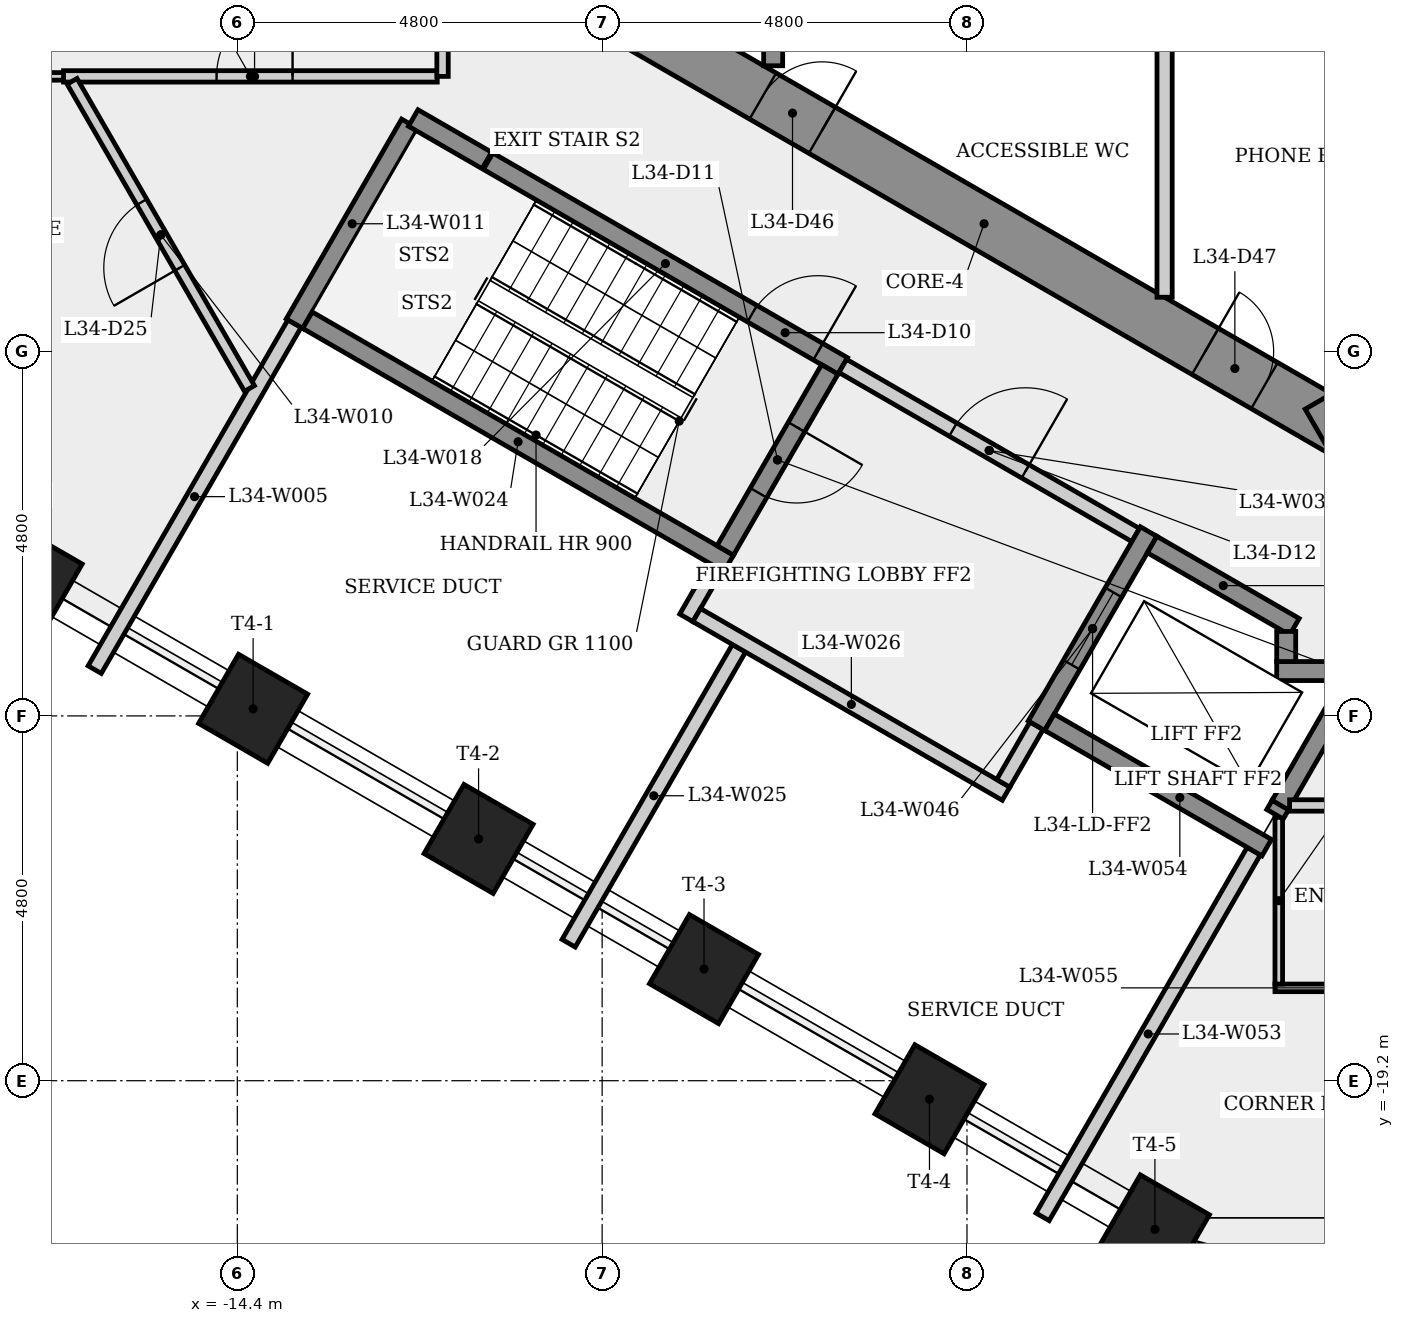
"""IFC4 building model, lengths in metres.
Left out: names, types, materials, properties, quantities, classifications, styles, units other than length and angle.
Written with IfcOpenShell. Run it as: python <this file> out.ifc"""

import sys

from ifc_helpers import new_model, si_unit, direction, frame, frame_2d, origin, origin_2d, place, context, subcontext, project, spatial, rectangle, extrude, element, fill, save


model = new_model("IFC4")
c1 = context("Model", 3, precision=1e-05, world=origin(), true_north=direction((0.0, 1.0)))
c2 = subcontext(c1, "Body", "Model", "MODEL_VIEW")
j1 = project(units=[si_unit("LENGTHUNIT", "METRE"), si_unit("PLANEANGLEUNIT", "RADIAN")], contexts=[c1])
p1 = place(None, origin())
s1 = spatial("IfcSite", under=j1, at=p1, CompositionType="ELEMENT")
p2 = place(p1, origin())
s2 = spatial("IfcBuilding", under=s1, at=p2, CompositionType="ELEMENT")
p3 = place(p2, frame((0.0, 0.0, 128.5)))
s3 = spatial("IfcBuildingStorey", under=s2, at=p3, CompositionType="ELEMENT", Elevation=128.5)
p4 = place(p3, frame((-9.325, -5.182, 0.0), z_axis=(0.0, 0.0, 1.0), x_axis=(0.866023993627, -0.500002442456, 0.0)))
e1 = element("IfcWall", 1, at=p4, inside=s3, PredefinedType="SHEAR", context=c2, shape_type="SweptSolid", body=[
    extrude(rectangle(XDim=10.97, YDim=0.7, at=frame_2d((5.485, 0.0))), origin(), (0.0, 0.0, 1.0), 4.0),
])
p5 = place(p4, frame((2.125, 0.0, 0.0)))
e2 = element("IfcOpeningElement", 2, at=p5, cuts=e1, PredefinedType="OPENING", context=c2, shape_type="SweptSolid", body=[
    extrude(rectangle(XDim=0.9, YDim=2.1, at=frame_2d((0.45, 1.05))), frame((0.0, 0.36, 0.0), z_axis=(0.0, -1.0, 0.0), x_axis=(1.0, 0.0, 0.0)), (0.0, 0.0, 1.0), 0.72),
])
p6 = place(p4, frame((8.845, 0.0, 0.0)))
e3 = element("IfcOpeningElement", 3, at=p6, cuts=e1, PredefinedType="OPENING", context=c2, shape_type="SweptSolid", body=[
    extrude(rectangle(XDim=0.9, YDim=2.1, at=frame_2d((0.45, 1.05))), frame((0.0, 0.36, 0.0), z_axis=(0.0, -1.0, 0.0), x_axis=(1.0, 0.0, 0.0)), (0.0, 0.0, 1.0), 0.72),
])
p7 = place(p3, frame((-0.175, -10.667, 0.0), z_axis=(0.0, 0.0, 1.0), x_axis=(0.866023993627, 0.500002442456, 0.0)))
e4 = element("IfcWall", 4, at=p7, inside=s3, PredefinedType="SHEAR", context=c2, shape_type="SweptSolid", body=[
    extrude(rectangle(XDim=10.97, YDim=0.7, at=frame_2d((5.485, 0.0))), origin(), (0.0, 0.0, 1.0), 4.0),
])
p8 = place(p7, frame((7.599, 0.0, 0.0)))
e5 = element("IfcOpeningElement", 5, at=p8, cuts=e4, PredefinedType="OPENING", context=c2, shape_type="SweptSolid", body=[
    extrude(rectangle(XDim=0.9, YDim=2.1, at=frame_2d((0.45, 1.05))), frame((0.0, 0.36, 0.0), z_axis=(0.0, -1.0, 0.0), x_axis=(1.0, 0.0, 0.0)), (0.0, 0.0, 1.0), 0.72),
])
for number, where, z_axis, x_axis in (
    (6, (-17.158, -12.594, 0.0), (0.0, 0.0, 1.0), (-0.5, -0.866, 0.0)),
    (7, (-14.192, -14.306, 0.0), (0.0, 0.0, 1.0), (-0.5, -0.866, 0.0)),
    (8, (-11.226, -16.019, 0.0), (0.0, 0.0, 1.0), (-0.5, -0.866, 0.0)),
    (9, (-8.26, -17.731, 0.0), (0.0, 0.0, 1.0), (-0.5, -0.866, 0.0)),
    (10, (-5.293, -19.444, 0.0), (0.0, 0.0, 1.0), (-0.5, -0.866, 0.0)),
    (11, (-2.327, -21.156, 0.0), (0.0, 0.0, 1.0), (-0.5, -0.866, 0.0)),
):
    element("IfcColumn", number, at=place(p3, frame(where, z_axis=z_axis, x_axis=x_axis)), inside=s3, PredefinedType="COLUMN", context=c2, shape_type="SweptSolid", body=[
        extrude(rectangle(XDim=1.05, YDim=1.05, at=origin_2d()), origin(), (0.0, 0.0, 1.0), 4.0),
    ])
p9 = place(p3, frame((-16.686, -5.985, 0.0), z_axis=(0.0, 0.0, 1.0), x_axis=(1.0, 0.0, 0.0)))
e12 = element("IfcWall", 12, at=p9, inside=s3, PredefinedType="PARTITIONING", context=c2, shape_type="SweptSolid", body=[
    extrude(rectangle(XDim=4.917, YDim=0.15, at=frame_2d((2.458, 0.0))), origin(), (0.0, 0.0, 1.0), 3.65),
])
p10 = place(p9, frame((2.013, 0.0, 0.0)))
e13 = element("IfcOpeningElement", 13, at=p10, cuts=e12, PredefinedType="OPENING", context=c2, shape_type="SweptSolid", body=[
    extrude(rectangle(XDim=1.0, YDim=2.1, at=frame_2d((0.5, 1.05))), frame((0.0, 0.085, 0.0), z_axis=(0.0, -1.0, 0.0), x_axis=(1.0, 0.0, 0.0)), (0.0, 0.0, 1.0), 0.17),
])
p11 = place(p3, frame((-16.686, -5.985, 0.0), z_axis=(0.0, 0.0, 1.0), x_axis=(-1.0, 0.0, 0.0)))
e14 = element("IfcWall", 14, at=p11, inside=s3, PredefinedType="PARTITIONING", context=c2, shape_type="SweptSolid", body=[
    extrude(rectangle(XDim=2.007, YDim=0.1, at=frame_2d((1.003, 0.0))), origin(), (0.0, 0.0, 1.0), 3.65),
])
p12 = place(p3, frame((-16.276, -13.791, 0.0), z_axis=(0.0, 0.0, 1.0), x_axis=(0.499970375258, 0.866042506961, 0.0)))
e15 = element("IfcWall", 15, at=p12, inside=s3, PredefinedType="PLUMBINGWALL", context=c2, shape_type="SweptSolid", body=[
    extrude(rectangle(XDim=5.257, YDim=0.2, at=frame_2d((2.628, 0.0))), origin(), (0.0, 0.0, 1.0), 3.65),
])
p13 = place(p3, frame((-14.24, -10.092, 0.0), z_axis=(0.0, 0.0, 1.0), x_axis=(-0.500021330162, 0.86601308846, 0.0)))
e16 = element("IfcWall", 16, at=p13, inside=s3, PredefinedType="PARTITIONING", context=c2, shape_type="SweptSolid", body=[
    extrude(rectangle(XDim=4.667, YDim=0.15, at=frame_2d((2.333, 0.0))), origin(), (0.0, 0.0, 1.0), 3.65),
])
p14 = place(p13, frame((1.833, 0.0, 0.0)))
e17 = element("IfcOpeningElement", 17, at=p14, cuts=e16, PredefinedType="OPENING", context=c2, shape_type="SweptSolid", body=[
    extrude(rectangle(XDim=1.0, YDim=2.1, at=frame_2d((0.5, 1.05))), frame((0.0, 0.085, 0.0), z_axis=(0.0, -1.0, 0.0), x_axis=(1.0, 0.0, 0.0)), (0.0, 0.0, 1.0), 0.17),
])
p15 = place(p3, frame((-13.648, -9.239, 0.0), z_axis=(0.0, 0.0, 1.0), x_axis=(0.50000556753, 0.866022189346, 0.0)))
e18 = element("IfcWall", 18, at=p15, inside=s3, PredefinedType="SHEAR", context=c2, shape_type="SweptSolid", body=[
    extrude(rectangle(XDim=3.036, YDim=0.25, at=frame_2d((1.518, 0.0))), origin(), (0.0, 0.0, 1.0), 3.65),
])
p16 = place(p3, frame((-12.085, -6.532, 0.0), z_axis=(0.0, 0.0, 1.0), x_axis=(0.86604373436, -0.499968249168, 0.0)))
e19 = element("IfcWall", 19, at=p16, inside=s3, PredefinedType="SHEAR", context=c2, shape_type="SweptSolid", body=[
    extrude(rectangle(XDim=1.118, YDim=0.25, at=frame_2d((0.559, 0.0))), origin(), (0.0, 0.0, 1.0), 3.65),
])
p17 = place(p3, frame((-11.7, 6.06, 0.0), z_axis=(0.0, 0.0, 1.0), x_axis=(0.0, -1.0, 0.0)))
e20 = element("IfcWall", 20, at=p17, inside=s3, PredefinedType="PARTITIONING", context=c2, shape_type="SweptSolid", body=[
    extrude(rectangle(XDim=12.046, YDim=0.15, at=frame_2d((6.023, 0.0))), origin(), (0.0, 0.0, 1.0), 3.65),
])
p18 = place(p17, frame((6.755, 0.0, 0.0)))
e21 = element("IfcOpeningElement", 21, at=p18, cuts=e20, PredefinedType="OPENING", context=c2, shape_type="SweptSolid", body=[
    extrude(rectangle(XDim=0.9, YDim=2.1, at=frame_2d((0.45, 1.05))), frame((0.0, 0.085, 0.0), z_axis=(0.0, -1.0, 0.0), x_axis=(1.0, 0.0, 0.0)), (0.0, 0.0, 1.0), 0.17),
])
p19 = place(p3, frame((-11.1, -7.101, 0.0), z_axis=(0.0, 0.0, 1.0), x_axis=(0.866028615007, -0.499994437958, 0.0)))
e22 = element("IfcWall", 22, at=p19, inside=s3, PredefinedType="SHEAR", context=c2, shape_type="SweptSolid", body=[
    extrude(rectangle(XDim=5.387, YDim=0.25, at=frame_2d((2.694, 0.0))), origin(), (0.0, 0.0, 1.0), 3.65),
])
p20 = place(p19, frame((4.012, 0.0, 0.0)))
e23 = element("IfcOpeningElement", 23, at=p20, cuts=e22, PredefinedType="OPENING", context=c2, shape_type="SweptSolid", body=[
    extrude(rectangle(XDim=1.0, YDim=2.1, at=frame_2d((0.5, 1.05))), frame((0.0, 0.135, 0.0), z_axis=(0.0, -1.0, 0.0), x_axis=(1.0, 0.0, 0.0)), (0.0, 0.0, 1.0), 0.27),
])
p21 = place(p3, frame((-8.493, -13.11, 0.0), z_axis=(0.0, 0.0, 1.0), x_axis=(0.500067724834, 0.865986299303, 0.0)))
e24 = element("IfcWall", 24, at=p21, inside=s3, PredefinedType="PLUMBINGWALL", context=c2, shape_type="SweptSolid", body=[
    extrude(rectangle(XDim=0.775, YDim=0.2, at=frame_2d((0.388, 0.0))), origin(), (0.0, 0.0, 1.0), 3.65),
])
p22 = place(p3, frame((-7.935, -12.393, 0.0), z_axis=(0.0, 0.0, 1.0), x_axis=(-0.866025499775, 0.499999833739, 0.0)))
e25 = element("IfcWall", 25, at=p22, inside=s3, PredefinedType="SHEAR", context=c2, shape_type="SweptSolid", body=[
    extrude(rectangle(XDim=6.4, YDim=0.25, at=frame_2d((3.2, 0.0))), origin(), (0.0, 0.0, 1.0), 3.65),
])
p23 = place(p3, frame((-7.8, -13.51, 0.0), z_axis=(0.0, 0.0, 1.0), x_axis=(-0.499994393058, -0.866028640929, 0.0)))
e26 = element("IfcWall", 26, at=p23, inside=s3, PredefinedType="PLUMBINGWALL", context=c2, shape_type="SweptSolid", body=[
    extrude(rectangle(XDim=4.481, YDim=0.2, at=frame_2d((2.241, 0.0))), origin(), (0.0, 0.0, 1.0), 3.65),
])
p24 = place(p3, frame((-8.356, -13.073, 0.0), z_axis=(0.0, 0.0, 1.0), x_axis=(0.866038532462, -0.499977259774, 0.0)))
e27 = element("IfcWall", 27, at=p24, inside=s3, PredefinedType="PLUMBINGWALL", context=c2, shape_type="SweptSolid", body=[
    extrude(rectangle(XDim=4.7, YDim=0.2, at=frame_2d((2.35, 0.0))), origin(), (0.0, 0.0, 1.0), 3.65),
])
p25 = place(p3, frame((-7.35, -5.846, 0.0), z_axis=(0.0, 0.0, 1.0), x_axis=(0.0, 1.0, 0.0)))
e28 = element("IfcWall", 28, at=p25, inside=s3, PredefinedType="SHEAR", context=c2, shape_type="SweptSolid", body=[
    extrude(rectangle(XDim=4.171, YDim=0.25, at=frame_2d((2.085, 0.0))), origin(), (0.0, 0.0, 1.0), 3.65),
])
p26 = place(p3, frame((-6.605, -9.841, 0.0), z_axis=(0.0, 0.0, 1.0), x_axis=(-0.499996545922, -0.866027397988, 0.0)))
e29 = element("IfcWall", 29, at=p26, inside=s3, PredefinedType="SHEAR", context=c2, shape_type="SweptSolid", body=[
    extrude(rectangle(XDim=2.75, YDim=0.25, at=frame_2d((1.375, 0.0))), origin(), (0.0, 0.0, 1.0), 3.65),
])
p27 = place(p26, frame((0.875, 0.0, 0.0)))
e30 = element("IfcOpeningElement", 30, at=p27, cuts=e29, PredefinedType="OPENING", context=c2, shape_type="SweptSolid", body=[
    extrude(rectangle(XDim=1.0, YDim=2.1, at=frame_2d((0.5, 1.05))), frame((0.0, 0.135, 0.0), z_axis=(0.0, -1.0, 0.0), x_axis=(1.0, 0.0, 0.0)), (0.0, 0.0, 1.0), 0.27),
])
p28 = place(p3, frame((-6.435, -9.795, 0.0), z_axis=(0.0, 0.0, 1.0), x_axis=(0.866012907634, -0.500021643343, 0.0)))
e31 = element("IfcWall", 31, at=p28, inside=s3, PredefinedType="PARTITIONING", context=c2, shape_type="SweptSolid", body=[
    extrude(rectangle(XDim=4.45, YDim=0.2, at=frame_2d((2.225, 0.0))), origin(), (0.0, 0.0, 1.0), 3.65),
])
p29 = place(p28, frame((1.675, 0.0, 0.0)))
e32 = element("IfcOpeningElement", 32, at=p29, cuts=e31, PredefinedType="OPENING", context=c2, shape_type="SweptSolid", body=[
    extrude(rectangle(XDim=1.1, YDim=2.1, at=frame_2d((0.55, 1.05))), frame((0.0, 0.11, 0.0), z_axis=(0.0, -1.0, 0.0), x_axis=(1.0, 0.0, 0.0)), (0.0, 0.0, 1.0), 0.22),
])
p30 = place(p3, frame((-3.885, -14.529, 0.0), z_axis=(0.0, 0.0, 1.0), x_axis=(-0.499859285417, -0.866106630146, 0.0)))
e33 = element("IfcWall", 33, at=p30, inside=s3, PredefinedType="PLUMBINGWALL", context=c2, shape_type="SweptSolid", body=[
    extrude(rectangle(XDim=0.875, YDim=0.2, at=frame_2d((0.438, 0.0))), origin(), (0.0, 0.0, 1.0), 3.65),
])
p31 = place(p3, frame((-2.41, -11.974, 0.0), z_axis=(0.0, 0.0, 1.0), x_axis=(-0.500001826776, -0.866024349092, 0.0)))
e34 = element("IfcWall", 34, at=p31, inside=s3, PredefinedType="SHEAR", context=c2, shape_type="SweptSolid", body=[
    extrude(rectangle(XDim=2.95, YDim=0.25, at=frame_2d((1.475, 0.0))), origin(), (0.0, 0.0, 1.0), 3.65),
])
p32 = place(p31, frame((0.925, 0.0, 0.0)))
e35 = element("IfcOpeningElement", 35, at=p32, cuts=e34, PredefinedType="OPENING", context=c2, shape_type="SweptSolid", body=[
    extrude(rectangle(XDim=1.1, YDim=2.1, at=frame_2d((0.55, 1.05))), frame((0.0, 0.135, 0.0), z_axis=(0.0, -1.0, 0.0), x_axis=(1.0, 0.0, 0.0)), (0.0, 0.0, 1.0), 0.27),
])
p33 = place(p3, frame((-2.364, -12.145, 0.0), z_axis=(0.0, 0.0, 1.0), x_axis=(0.86603892542, -0.499976579108, 0.0)))
e36 = element("IfcWall", 36, at=p33, inside=s3, PredefinedType="SHEAR", context=c2, shape_type="SweptSolid", body=[
    extrude(rectangle(XDim=2.162, YDim=0.25, at=frame_2d((1.081, 0.0))), origin(), (0.0, 0.0, 1.0), 3.65),
])
p34 = place(p3, frame((-2.2, -5.275, 0.0), z_axis=(0.0, 0.0, 1.0), x_axis=(0.0, -1.0, 0.0)))
e37 = element("IfcWall", 37, at=p34, inside=s3, PredefinedType="PARTITIONING", context=c2, shape_type="SweptSolid", body=[
    extrude(rectangle(XDim=3.616, YDim=0.2, at=frame_2d((1.808, 0.0))), origin(), (0.0, 0.0, 1.0), 3.65),
])
p35 = place(p3, frame((-1.027, -16.179, 0.0), z_axis=(0.0, 0.0, 1.0), x_axis=(-0.499995019066, -0.866028279509, 0.0)))
e38 = element("IfcWall", 38, at=p35, inside=s3, PredefinedType="PLUMBINGWALL", context=c2, shape_type="SweptSolid", body=[
    extrude(rectangle(XDim=5.557, YDim=0.2, at=frame_2d((2.778, 0.0))), origin(), (0.0, 0.0, 1.0), 3.65),
])
p36 = place(p3, frame((-0.856, -16.133, 0.0), z_axis=(0.0, 0.0, 1.0), x_axis=(-0.866021716278, 0.500006386895, 0.0)))
e39 = element("IfcWall", 39, at=p36, inside=s3, PredefinedType="SHEAR", context=c2, shape_type="SweptSolid", body=[
    extrude(rectangle(XDim=3.3, YDim=0.25, at=frame_2d((1.65, 0.0))), origin(), (0.0, 0.0, 1.0), 3.65),
])
p37 = place(p3, frame((-0.748, -17.979, 0.0), z_axis=(0.0, 0.0, 1.0), x_axis=(1.0, 0.0, 0.0)))
e40 = element("IfcWall", 40, at=p37, inside=s3, PredefinedType="PARTITIONING", context=c2, shape_type="SweptSolid", body=[
    extrude(rectangle(XDim=2.567, YDim=0.1, at=frame_2d((1.283, 0.0))), origin(), (0.0, 0.0, 1.0), 3.65),
])
p38 = place(p37, frame((0.883, 0.0, 0.0)))
e41 = element("IfcOpeningElement", 41, at=p38, cuts=e40, PredefinedType="OPENING", context=c2, shape_type="SweptSolid", body=[
    extrude(rectangle(XDim=0.8, YDim=2.1, at=frame_2d((0.4, 1.05))), frame((0.0, 0.06, 0.0), z_axis=(0.0, -1.0, 0.0), x_axis=(1.0, 0.0, 0.0)), (0.0, 0.0, 1.0), 0.12),
])
p39 = place(p3, frame((-0.698, -15.733, 0.0), z_axis=(0.0, 0.0, 1.0), x_axis=(0.0, -1.0, 0.0)))
e42 = element("IfcWall", 42, at=p39, inside=s3, PredefinedType="PARTITIONING", context=c2, shape_type="SweptSolid", body=[
    extrude(rectangle(XDim=2.195, YDim=0.1, at=frame_2d((1.098, 0.0))), origin(), (0.0, 0.0, 1.0), 3.65),
])
p40 = place(p3, frame((-0.673, -15.565, 0.0), z_axis=(0.0, 0.0, 1.0), x_axis=(-0.499486146622, -0.866321873978, 0.0)))
e43 = element("IfcWall", 43, at=p40, inside=s3, PredefinedType="SHEAR", context=c2, shape_type="SweptSolid", body=[
    extrude(rectangle(XDim=0.149, YDim=0.25, at=frame_2d((0.075, 0.0))), origin(), (0.0, 0.0, 1.0), 4.0),
])
p41 = place(p3, frame((-0.725, -13.81, 0.0), z_axis=(0.0, 0.0, 1.0), x_axis=(1.0, 0.0, 0.0)))
e44 = element("IfcWall", 44, at=p41, inside=s3, PredefinedType="SHEAR", context=c2, shape_type="SweptSolid", body=[
    extrude(rectangle(XDim=1.191, YDim=0.25, at=frame_2d((0.595, 0.0))), origin(), (0.0, 0.0, 1.0), 3.65),
])
p42 = place(p3, frame((-0.6, -13.289, 0.0), z_axis=(0.0, 0.0, 1.0), x_axis=(0.0, -1.0, 0.0)))
e45 = element("IfcWall", 45, at=p42, inside=s3, PredefinedType="SHEAR", context=c2, shape_type="SweptSolid", body=[
    extrude(rectangle(XDim=0.396, YDim=0.25, at=frame_2d((0.198, 0.0))), origin(), (0.0, 0.0, 1.0), 4.0),
])
p43 = place(p3, frame((0.278, -13.918, 0.0), z_axis=(0.0, 0.0, 1.0), x_axis=(-0.499984020225, -0.866034629516, 0.0)))
e46 = element("IfcWall", 46, at=p43, inside=s3, PredefinedType="SHEAR", context=c2, shape_type="SweptSolid", body=[
    extrude(rectangle(XDim=1.912, YDim=0.25, at=frame_2d((0.956, 0.0))), origin(), (0.0, 0.0, 1.0), 4.0),
])
p44 = place(p3, frame((-0.555, -15.578, 0.0), z_axis=(0.0, 0.0, 1.0), x_axis=(1.0, 0.0, 0.0)))
e47 = element("IfcWall", 47, at=p44, inside=s3, PredefinedType="PARTITIONING", context=c2, shape_type="SweptSolid", body=[
    extrude(rectangle(XDim=3.907, YDim=0.15, at=frame_2d((1.954, 0.0))), origin(), (0.0, 0.0, 1.0), 3.65),
])
p45 = place(p44, frame((2.681, 0.0, 0.0)))
e48 = element("IfcOpeningElement", 48, at=p45, cuts=e47, PredefinedType="OPENING", context=c2, shape_type="SweptSolid", body=[
    extrude(rectangle(XDim=0.9, YDim=2.1, at=frame_2d((0.45, 1.05))), frame((0.0, 0.085, 0.0), z_axis=(0.0, -1.0, 0.0), x_axis=(1.0, 0.0, 0.0)), (0.0, 0.0, 1.0), 0.17),
])
p46 = place(p20, origin())
e49 = element("IfcDoor", 49, at=p46, inside=s3, OperationType="SINGLE_SWING_RIGHT", PredefinedType="DOOR", context=c2, shape_type="SweptSolid", body=[
    extrude(rectangle(XDim=1.0, YDim=2.1, at=frame_2d((0.5, 1.05))), frame((0.0, 0.025, 0.0), z_axis=(0.0, -1.0, 0.0), x_axis=(1.0, 0.0, 0.0)), (0.0, 0.0, 1.0), 0.05),
])
fill(e23, e49)
p47 = place(p27, origin())
e50 = element("IfcDoor", 50, at=p47, inside=s3, OperationType="SINGLE_SWING_LEFT", PredefinedType="DOOR", context=c2, shape_type="SweptSolid", body=[
    extrude(rectangle(XDim=1.0, YDim=2.1, at=frame_2d((0.5, 1.05))), frame((0.0, 0.025, 0.0), z_axis=(0.0, -1.0, 0.0), x_axis=(1.0, 0.0, 0.0)), (0.0, 0.0, 1.0), 0.05),
])
fill(e30, e50)
p48 = place(p29, origin())
e51 = element("IfcDoor", 51, at=p48, inside=s3, OperationType="SINGLE_SWING_RIGHT", PredefinedType="DOOR", context=c2, shape_type="SweptSolid", body=[
    extrude(rectangle(XDim=1.1, YDim=2.1, at=frame_2d((0.55, 1.05))), frame((0.0, 0.025, 0.0), z_axis=(0.0, -1.0, 0.0), x_axis=(1.0, 0.0, 0.0)), (0.0, 0.0, 1.0), 0.05),
])
fill(e32, e51)
p49 = place(p32, origin())
e52 = element("IfcDoor", 52, at=p49, inside=s3, OperationType="SLIDING_TO_LEFT", PredefinedType="DOOR", context=c2, shape_type="SweptSolid", body=[
    extrude(rectangle(XDim=1.1, YDim=2.1, at=frame_2d((0.55, 1.05))), frame((0.0, 0.025, 0.0), z_axis=(0.0, -1.0, 0.0), x_axis=(1.0, 0.0, 0.0)), (0.0, 0.0, 1.0), 0.05),
])
fill(e35, e52)
p50 = place(p10, origin())
e53 = element("IfcDoor", 53, at=p50, inside=s3, OperationType="SINGLE_SWING_RIGHT", PredefinedType="DOOR", context=c2, shape_type="SweptSolid", body=[
    extrude(rectangle(XDim=1.0, YDim=2.1, at=frame_2d((0.5, 1.05))), frame((0.0, 0.025, 0.0), z_axis=(0.0, -1.0, 0.0), x_axis=(1.0, 0.0, 0.0)), (0.0, 0.0, 1.0), 0.05),
])
fill(e13, e53)
p51 = place(p14, origin())
e54 = element("IfcDoor", 54, at=p51, inside=s3, OperationType="SINGLE_SWING_LEFT", PredefinedType="DOOR", context=c2, shape_type="SweptSolid", body=[
    extrude(rectangle(XDim=1.0, YDim=2.1, at=frame_2d((0.5, 1.05))), frame((0.0, 0.025, 0.0), z_axis=(0.0, -1.0, 0.0), x_axis=(1.0, 0.0, 0.0)), (0.0, 0.0, 1.0), 0.05),
])
fill(e17, e54)
p52 = place(p5, origin())
e55 = element("IfcDoor", 55, at=p52, inside=s3, OperationType="SINGLE_SWING_RIGHT", PredefinedType="DOOR", context=c2, shape_type="SweptSolid", body=[
    extrude(rectangle(XDim=0.9, YDim=2.1, at=frame_2d((0.45, 1.05))), frame((0.0, 0.025, 0.0), z_axis=(0.0, -1.0, 0.0), x_axis=(1.0, 0.0, 0.0)), (0.0, 0.0, 1.0), 0.05),
])
fill(e2, e55)
p53 = place(p6, origin())
e56 = element("IfcDoor", 56, at=p53, inside=s3, OperationType="SINGLE_SWING_LEFT", PredefinedType="DOOR", context=c2, shape_type="SweptSolid", body=[
    extrude(rectangle(XDim=0.9, YDim=2.1, at=frame_2d((0.45, 1.05))), frame((0.0, 0.025, 0.0), z_axis=(0.0, -1.0, 0.0), x_axis=(1.0, 0.0, 0.0)), (0.0, 0.0, 1.0), 0.05),
])
fill(e3, e56)
save(model, sys.argv[1])
